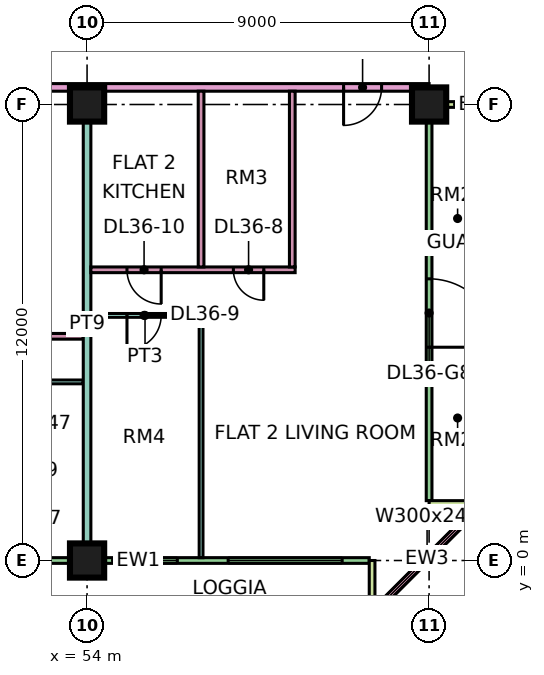
"""IFC4 building model, lengths in metres.
Left out: names, types, materials, properties, quantities, classifications, styles, units other than length and angle.
Written with IfcOpenShell. Run it as: python <this file> out.ifc"""

import sys

from ifc_helpers import new_model, si_unit, direction, frame, frame_2d, origin, origin_2d, place, context, subcontext, project, spatial, rectangle, extrude, element, fill, save


model = new_model("IFC4")
c1 = context("Model", 3, precision=1e-05, world=origin(), true_north=direction((0.0, 1.0)))
c2 = subcontext(c1, "Body", "Model", "MODEL_VIEW")
j1 = project(units=[si_unit("LENGTHUNIT", "METRE"), si_unit("PLANEANGLEUNIT", "RADIAN")], contexts=[c1])
p1 = place(None, origin())
s1 = spatial("IfcSite", under=j1, at=p1, CompositionType="ELEMENT")
p2 = place(p1, origin())
s2 = spatial("IfcBuilding", under=s1, at=p2, CompositionType="ELEMENT")
p3 = place(p2, frame((0.0, 0.0, 161.15)))
s3 = spatial("IfcBuildingStorey", under=s2, at=p3, CompositionType="ELEMENT", Elevation=161.15)
for number, where, z_axis, x_axis in (
    (1, (54.0, 0.0, 0.0), (0.0, 0.0, 1.0), (1.0, 0.0, 0.0)),
    (2, (54.0, 12.0, 0.0), (0.0, 0.0, 1.0), (1.0, 0.0, 0.0)),
    (3, (63.0, 12.0, 0.0), (0.0, 0.0, 1.0), (1.0, 0.0, 0.0)),
):
    element("IfcColumn", number, at=place(p3, frame(where, z_axis=z_axis, x_axis=x_axis)), inside=s3, PredefinedType="COLUMN", context=c2, shape_type="SweptSolid", body=[
        extrude(rectangle(XDim=0.9, YDim=0.9, at=origin_2d()), origin(), (0.0, 0.0, 1.0), 3.75),
    ])
p4 = place(p3, frame((48.075, 0.0, 0.0), z_axis=(0.0, 0.0, 1.0), x_axis=(1.0, 0.0, 0.0)))
e4 = element("IfcWall", 4, at=p4, inside=s3, PredefinedType="SOLIDWALL", context=c2, shape_type="SweptSolid", body=[
    extrude(rectangle(XDim=13.35, YDim=0.15, at=frame_2d((6.675, 0.0))), origin(), (0.0, 0.0, 1.0), 3.35),
])
p5 = place(p4, frame((0.562, 0.0, 0.45)))
e5 = element("IfcOpeningElement", 5, at=p5, cuts=e4, PredefinedType="OPENING", context=c2, shape_type="SweptSolid", body=[
    extrude(rectangle(XDim=1.8, YDim=2.4, at=frame_2d((0.9, 1.2))), frame((0.0, 0.085, 0.0), z_axis=(0.0, -1.0, 0.0), x_axis=(1.0, 0.0, 0.0)), (0.0, 0.0, 1.0), 0.17),
])
p6 = place(p4, frame((3.55, 0.0, 0.0)))
e6 = element("IfcOpeningElement", 6, at=p6, cuts=e4, PredefinedType="OPENING", context=c2, shape_type="SweptSolid", body=[
    extrude(rectangle(XDim=1.2, YDim=2.4, at=frame_2d((0.6, 1.2))), frame((0.0, 0.085, 0.0), z_axis=(0.0, -1.0, 0.0), x_axis=(1.0, 0.0, 0.0)), (0.0, 0.0, 1.0), 0.17),
])
p7 = place(p4, frame((7.1, 0.0, 0.45)))
e7 = element("IfcOpeningElement", 7, at=p7, cuts=e4, PredefinedType="OPENING", context=c2, shape_type="SweptSolid", body=[
    extrude(rectangle(XDim=1.2, YDim=2.4, at=frame_2d((0.6, 1.2))), frame((0.0, 0.085, 0.0), z_axis=(0.0, -1.0, 0.0), x_axis=(1.0, 0.0, 0.0)), (0.0, 0.0, 1.0), 0.17),
])
p8 = place(p4, frame((9.637, 0.0, 0.45)))
e8 = element("IfcOpeningElement", 8, at=p8, cuts=e4, PredefinedType="OPENING", context=c2, shape_type="SweptSolid", body=[
    extrude(rectangle(XDim=3.0, YDim=2.4, at=frame_2d((1.5, 1.2))), frame((0.0, 0.085, 0.0), z_axis=(0.0, -1.0, 0.0), x_axis=(1.0, 0.0, 0.0)), (0.0, 0.0, 1.0), 0.17),
])
p9 = place(p3, frame((61.5, -1.5, 0.0), z_axis=(0.0, 0.0, 1.0), x_axis=(0.0, 1.0, 0.0)))
e9 = element("IfcWall", 9, at=p9, inside=s3, PredefinedType="SOLIDWALL", context=c2, shape_type="SweptSolid", body=[
    extrude(rectangle(XDim=1.5, YDim=0.15, at=frame_2d((0.75, 0.0))), origin(), (0.0, 0.0, 1.0), 3.35),
])
p10 = place(p3, frame((61.447, -1.447, 0.0), z_axis=(0.0, 0.0, 1.0), x_axis=(0.707106781187, 0.707106781187, 0.0)))
e10 = element("IfcWall", 10, at=p10, inside=s3, PredefinedType="SOLIDWALL", context=c2, shape_type="SweptSolid", body=[
    extrude(rectangle(XDim=4.243, YDim=0.15, at=frame_2d((2.121, 0.0))), origin(), (0.0, 0.0, 1.0), 3.35),
])
p11 = place(p10, frame((0.621, 0.0, 0.45)))
e11 = element("IfcOpeningElement", 11, at=p11, cuts=e10, PredefinedType="OPENING", context=c2, shape_type="SweptSolid", body=[
    extrude(rectangle(XDim=3.0, YDim=2.4, at=frame_2d((1.5, 1.2))), frame((0.0, 0.085, 0.0), z_axis=(0.0, -1.0, 0.0), x_axis=(1.0, 0.0, 0.0)), (0.0, 0.0, 1.0), 0.17),
])
p12 = place(p3, frame((63.0, 1.575, 0.0), z_axis=(0.0, 0.0, 1.0), x_axis=(0.0, 1.0, 0.0)))
e12 = element("IfcWall", 12, at=p12, inside=s3, PredefinedType="SOLIDWALL", context=c2, shape_type="SweptSolid", body=[
    extrude(rectangle(XDim=10.35, YDim=0.15, at=frame_2d((5.175, 0.0))), origin(), (0.0, 0.0, 1.0), 3.35),
])
p13 = place(p12, frame((4.038, 0.0, 0.0)))
e13 = element("IfcOpeningElement", 13, at=p13, cuts=e12, PredefinedType="OPENING", context=c2, shape_type="SweptSolid", body=[
    extrude(rectangle(XDim=1.8, YDim=2.4, at=frame_2d((0.9, 1.2))), frame((0.0, 0.085, 0.0), z_axis=(0.0, -1.0, 0.0), x_axis=(1.0, 0.0, 0.0)), (0.0, 0.0, 1.0), 0.17),
])
for number, where, z_axis, x_axis in (
    (14, (64.5, 1.5, 0.0), (0.0, 0.0, 1.0), (-1.0, 0.0, 0.0)),
    (15, (64.5, 12.0, 0.0), (0.0, 0.0, 1.0), (-1.0, 0.0, 0.0)),
):
    element("IfcWall", number, at=place(p3, frame(where, z_axis=z_axis, x_axis=x_axis)), inside=s3, PredefinedType="SOLIDWALL", context=c2, shape_type="SweptSolid", body=[
        extrude(rectangle(XDim=1.5, YDim=0.15, at=frame_2d((0.75, 0.0))), origin(), (0.0, 0.0, 1.0), 3.35),
    ])
p14 = place(p3, frame((33.05, 4.7, 0.0), z_axis=(0.0, 0.0, 1.0), x_axis=(1.0, 0.0, 0.0)))
e16 = element("IfcWall", 16, at=p14, inside=s3, PredefinedType="PARTITIONING", context=c2, shape_type="SweptSolid", body=[
    extrude(rectangle(XDim=20.85, YDim=0.1, at=frame_2d((10.425, 0.0))), origin(), (0.0, 0.0, 1.0), 3.35),
])
p15 = place(p14, frame((1.0, 0.0, 0.0)))
e17 = element("IfcOpeningElement", 17, at=p15, cuts=e16, PredefinedType="OPENING", context=c2, shape_type="SweptSolid", body=[
    extrude(rectangle(XDim=0.9, YDim=2.1, at=frame_2d((0.45, 1.05))), frame((0.0, 0.06, 0.0), z_axis=(0.0, -1.0, 0.0), x_axis=(1.0, 0.0, 0.0)), (0.0, 0.0, 1.0), 0.12),
])
p16 = place(p14, frame((13.0, 0.0, 0.0)))
e18 = element("IfcOpeningElement", 18, at=p16, cuts=e16, PredefinedType="OPENING", context=c2, shape_type="SweptSolid", body=[
    extrude(rectangle(XDim=0.9, YDim=2.1, at=frame_2d((0.45, 1.05))), frame((0.0, 0.06, 0.0), z_axis=(0.0, -1.0, 0.0), x_axis=(1.0, 0.0, 0.0)), (0.0, 0.0, 1.0), 0.12),
])
p17 = place(p14, frame((16.0, 0.0, 0.0)))
e19 = element("IfcOpeningElement", 19, at=p17, cuts=e16, PredefinedType="OPENING", context=c2, shape_type="SweptSolid", body=[
    extrude(rectangle(XDim=0.9, YDim=2.1, at=frame_2d((0.45, 1.05))), frame((0.0, 0.06, 0.0), z_axis=(0.0, -1.0, 0.0), x_axis=(1.0, 0.0, 0.0)), (0.0, 0.0, 1.0), 0.12),
])
p18 = place(p14, frame((19.0, 0.0, 0.0)))
e20 = element("IfcOpeningElement", 20, at=p18, cuts=e16, PredefinedType="OPENING", context=c2, shape_type="SweptSolid", body=[
    extrude(rectangle(XDim=0.9, YDim=2.1, at=frame_2d((0.45, 1.05))), frame((0.0, 0.06, 0.0), z_axis=(0.0, -1.0, 0.0), x_axis=(1.0, 0.0, 0.0)), (0.0, 0.0, 1.0), 0.12),
])
p19 = place(p14, frame((7.0, 0.0, 0.0)))
e21 = element("IfcOpeningElement", 21, at=p19, cuts=e16, PredefinedType="OPENING", context=c2, shape_type="SweptSolid", body=[
    extrude(rectangle(XDim=0.9, YDim=2.1, at=frame_2d((0.45, 1.05))), frame((0.0, 0.06, 0.0), z_axis=(0.0, -1.0, 0.0), x_axis=(1.0, 0.0, 0.0)), (0.0, 0.0, 1.0), 0.12),
])
p20 = place(p3, frame((40.65, 12.45, 0.0), z_axis=(0.0, 0.0, 1.0), x_axis=(1.0, 0.0, 0.0)))
e22 = element("IfcWall", 22, at=p20, inside=s3, PredefinedType="PARTITIONING", context=c2, shape_type="SweptSolid", body=[
    extrude(rectangle(XDim=22.35, YDim=0.2, at=frame_2d((11.175, 0.0))), origin(), (0.0, 0.0, 1.0), 3.35),
])
p21 = place(p20, frame((20.1, 0.0, 0.0)))
e23 = element("IfcOpeningElement", 23, at=p21, cuts=e22, PredefinedType="OPENING", context=c2, shape_type="SweptSolid", body=[
    extrude(rectangle(XDim=1.0, YDim=2.1, at=frame_2d((0.5, 1.05))), frame((0.0, 0.11, 0.0), z_axis=(0.0, -1.0, 0.0), x_axis=(1.0, 0.0, 0.0)), (0.0, 0.0, 1.0), 0.22),
])
p22 = place(p20, frame((1.05, 0.0, 0.0)))
e24 = element("IfcOpeningElement", 24, at=p22, cuts=e22, PredefinedType="OPENING", context=c2, shape_type="SweptSolid", body=[
    extrude(rectangle(XDim=1.0, YDim=2.1, at=frame_2d((0.5, 1.05))), frame((0.0, 0.11, 0.0), z_axis=(0.0, -1.0, 0.0), x_axis=(1.0, 0.0, 0.0)), (0.0, 0.0, 1.0), 0.22),
])
p23 = place(p3, frame((43.575, 5.9, 0.0), z_axis=(0.0, 0.0, 1.0), x_axis=(1.0, 0.0, 0.0)))
e25 = element("IfcWall", 25, at=p23, inside=s3, PredefinedType="PARTITIONING", context=c2, shape_type="SweptSolid", body=[
    extrude(rectangle(XDim=10.325, YDim=0.15, at=frame_2d((5.163, 0.0))), origin(), (0.0, 0.0, 1.0), 3.35),
])
p24 = place(p23, frame((1.825, 0.0, 0.0)))
e26 = element("IfcOpeningElement", 26, at=p24, cuts=e25, PredefinedType="OPENING", context=c2, shape_type="SweptSolid", body=[
    extrude(rectangle(XDim=0.8, YDim=2.1, at=frame_2d((0.4, 1.05))), frame((0.0, 0.085, 0.0), z_axis=(0.0, -1.0, 0.0), x_axis=(1.0, 0.0, 0.0)), (0.0, 0.0, 1.0), 0.17),
])
p25 = place(p23, frame((6.975, 0.0, 0.0)))
e27 = element("IfcOpeningElement", 27, at=p25, cuts=e25, PredefinedType="OPENING", context=c2, shape_type="SweptSolid", body=[
    extrude(rectangle(XDim=0.9, YDim=2.1, at=frame_2d((0.45, 1.05))), frame((0.0, 0.085, 0.0), z_axis=(0.0, -1.0, 0.0), x_axis=(1.0, 0.0, 0.0)), (0.0, 0.0, 1.0), 0.17),
])
p26 = place(p3, frame((54.0, 0.074, 0.0), z_axis=(0.0, 0.0, 1.0), x_axis=(0.0, 1.0, 0.0)))
e28 = element("IfcWall", 28, at=p26, inside=s3, PredefinedType="PARTITIONING", context=c2, shape_type="SweptSolid", body=[
    extrude(rectangle(XDim=12.276, YDim=0.2, at=frame_2d((6.138, 0.0))), origin(), (0.0, 0.0, 1.0), 3.35),
])
p27 = place(p3, frame((54.1, 6.45, 0.0), z_axis=(0.0, 0.0, 1.0), x_axis=(1.0, 0.0, 0.0)))
e29 = element("IfcWall", 29, at=p27, inside=s3, PredefinedType="PARTITIONING", context=c2, shape_type="SweptSolid", body=[
    extrude(rectangle(XDim=2.85, YDim=0.1, at=frame_2d((1.425, 0.0))), origin(), (0.0, 0.0, 1.0), 3.35),
])
p28 = place(p27, frame((0.95, 0.0, 0.0)))
e30 = element("IfcOpeningElement", 30, at=p28, cuts=e29, PredefinedType="OPENING", context=c2, shape_type="SweptSolid", body=[
    extrude(rectangle(XDim=0.9, YDim=2.1, at=frame_2d((0.45, 1.05))), frame((0.0, 0.06, 0.0), z_axis=(0.0, -1.0, 0.0), x_axis=(1.0, 0.0, 0.0)), (0.0, 0.0, 1.0), 0.12),
])
p29 = place(p3, frame((54.1, 7.65, 0.0), z_axis=(0.0, 0.0, 1.0), x_axis=(1.0, 0.0, 0.0)))
e31 = element("IfcWall", 31, at=p29, inside=s3, PredefinedType="PARTITIONING", context=c2, shape_type="SweptSolid", body=[
    extrude(rectangle(XDim=5.375, YDim=0.15, at=frame_2d((2.688, 0.0))), origin(), (0.0, 0.0, 1.0), 3.35),
])
p30 = place(p29, frame((3.75, 0.0, 0.0)))
e32 = element("IfcOpeningElement", 32, at=p30, cuts=e31, PredefinedType="OPENING", context=c2, shape_type="SweptSolid", body=[
    extrude(rectangle(XDim=0.8, YDim=2.1, at=frame_2d((0.4, 1.05))), frame((0.0, 0.085, 0.0), z_axis=(0.0, -1.0, 0.0), x_axis=(1.0, 0.0, 0.0)), (0.0, 0.0, 1.0), 0.17),
])
p31 = place(p29, frame((0.95, 0.0, 0.0)))
e33 = element("IfcOpeningElement", 33, at=p31, cuts=e31, PredefinedType="OPENING", context=c2, shape_type="SweptSolid", body=[
    extrude(rectangle(XDim=0.9, YDim=2.1, at=frame_2d((0.45, 1.05))), frame((0.0, 0.085, 0.0), z_axis=(0.0, -1.0, 0.0), x_axis=(1.0, 0.0, 0.0)), (0.0, 0.0, 1.0), 0.17),
])
p32 = place(p3, frame((57.0, 0.074, 0.0), z_axis=(0.0, 0.0, 1.0), x_axis=(0.0, 1.0, 0.0)))
e34 = element("IfcWall", 34, at=p32, inside=s3, PredefinedType="PARTITIONING", context=c2, shape_type="SweptSolid", body=[
    extrude(rectangle(XDim=6.426, YDim=0.1, at=frame_2d((3.213, 0.0))), origin(), (0.0, 0.0, 1.0), 3.35),
])
for number, where, z_axis, x_axis in (
    (35, (57.0, 7.725, 0.0), (0.0, 0.0, 1.0), (0.0, 1.0, 0.0)),
    (36, (59.4, 7.725, 0.0), (0.0, 0.0, 1.0), (0.0, 1.0, 0.0)),
):
    element("IfcWall", number, at=place(p3, frame(where, z_axis=z_axis, x_axis=x_axis)), inside=s3, PredefinedType="PARTITIONING", context=c2, shape_type="SweptSolid", body=[
        extrude(rectangle(XDim=4.625, YDim=0.15, at=frame_2d((2.312, 0.0))), origin(), (0.0, 0.0, 1.0), 3.35),
    ])
p33 = place(p7, origin())
e37 = element("IfcWindow", 37, at=p33, inside=s3, PartitioningType="SINGLE_PANEL", PredefinedType="WINDOW", context=c2, shape_type="SweptSolid", body=[
    extrude(rectangle(XDim=1.2, YDim=2.4, at=frame_2d((0.6, 1.2))), frame((0.0, 0.03, 0.0), z_axis=(0.0, -1.0, 0.0), x_axis=(1.0, 0.0, 0.0)), (0.0, 0.0, 1.0), 0.06),
])
fill(e7, e37)
p34 = place(p8, origin())
e38 = element("IfcWindow", 38, at=p34, inside=s3, PartitioningType="SINGLE_PANEL", PredefinedType="WINDOW", context=c2, shape_type="SweptSolid", body=[
    extrude(rectangle(XDim=3.0, YDim=2.4, at=frame_2d((1.5, 1.2))), frame((0.0, 0.03, 0.0), z_axis=(0.0, -1.0, 0.0), x_axis=(1.0, 0.0, 0.0)), (0.0, 0.0, 1.0), 0.06),
])
fill(e8, e38)
p35 = place(p11, origin())
e39 = element("IfcWindow", 39, at=p35, inside=s3, PartitioningType="SINGLE_PANEL", PredefinedType="WINDOW", context=c2, shape_type="SweptSolid", body=[
    extrude(rectangle(XDim=3.0, YDim=2.4, at=frame_2d((1.5, 1.2))), frame((0.0, 0.03, 0.0), z_axis=(0.0, -1.0, 0.0), x_axis=(1.0, 0.0, 0.0)), (0.0, 0.0, 1.0), 0.06),
])
fill(e11, e39)
p36 = place(p13, frame((1.8, 0.0, 0.0), z_axis=(0.0, 0.0, 1.0), x_axis=(-1.0, 0.0, 0.0)))
e40 = element("IfcDoor", 40, at=p36, inside=s3, OperationType="DOUBLE_DOOR_SINGLE_SWING", PredefinedType="DOOR", context=c2, shape_type="SweptSolid", body=[
    extrude(rectangle(XDim=1.8, YDim=2.4, at=frame_2d((0.9, 1.2))), frame((0.0, 0.025, 0.0), z_axis=(0.0, -1.0, 0.0), x_axis=(1.0, 0.0, 0.0)), (0.0, 0.0, 1.0), 0.05),
])
fill(e13, e40)
p37 = place(p30, origin())
e41 = element("IfcDoor", 41, at=p37, inside=s3, OperationType="SINGLE_SWING_RIGHT", PredefinedType="DOOR", context=c2, shape_type="SweptSolid", body=[
    extrude(rectangle(XDim=0.8, YDim=2.1, at=frame_2d((0.4, 1.05))), frame((0.0, 0.025, 0.0), z_axis=(0.0, -1.0, 0.0), x_axis=(1.0, 0.0, 0.0)), (0.0, 0.0, 1.0), 0.05),
])
fill(e32, e41)
p38 = place(p28, frame((0.9, 0.0, 0.0), z_axis=(0.0, 0.0, 1.0), x_axis=(-1.0, 0.0, 0.0)))
e42 = element("IfcDoor", 42, at=p38, inside=s3, OperationType="SINGLE_SWING_LEFT", PredefinedType="DOOR", context=c2, shape_type="SweptSolid", body=[
    extrude(rectangle(XDim=0.9, YDim=2.1, at=frame_2d((0.45, 1.05))), frame((0.0, 0.025, 0.0), z_axis=(0.0, -1.0, 0.0), x_axis=(1.0, 0.0, 0.0)), (0.0, 0.0, 1.0), 0.05),
])
fill(e30, e42)
p39 = place(p31, origin())
e43 = element("IfcDoor", 43, at=p39, inside=s3, OperationType="SINGLE_SWING_RIGHT", PredefinedType="DOOR", context=c2, shape_type="SweptSolid", body=[
    extrude(rectangle(XDim=0.9, YDim=2.1, at=frame_2d((0.45, 1.05))), frame((0.0, 0.025, 0.0), z_axis=(0.0, -1.0, 0.0), x_axis=(1.0, 0.0, 0.0)), (0.0, 0.0, 1.0), 0.05),
])
fill(e33, e43)
p40 = place(p21, frame((1.0, 0.0, 0.0), z_axis=(0.0, 0.0, 1.0), x_axis=(-1.0, 0.0, 0.0)))
e44 = element("IfcDoor", 44, at=p40, inside=s3, OperationType="SINGLE_SWING_LEFT", PredefinedType="DOOR", context=c2, shape_type="SweptSolid", body=[
    extrude(rectangle(XDim=1.0, YDim=2.1, at=frame_2d((0.5, 1.05))), frame((0.0, 0.025, 0.0), z_axis=(0.0, -1.0, 0.0), x_axis=(1.0, 0.0, 0.0)), (0.0, 0.0, 1.0), 0.05),
])
fill(e23, e44)
save(model, sys.argv[1])
